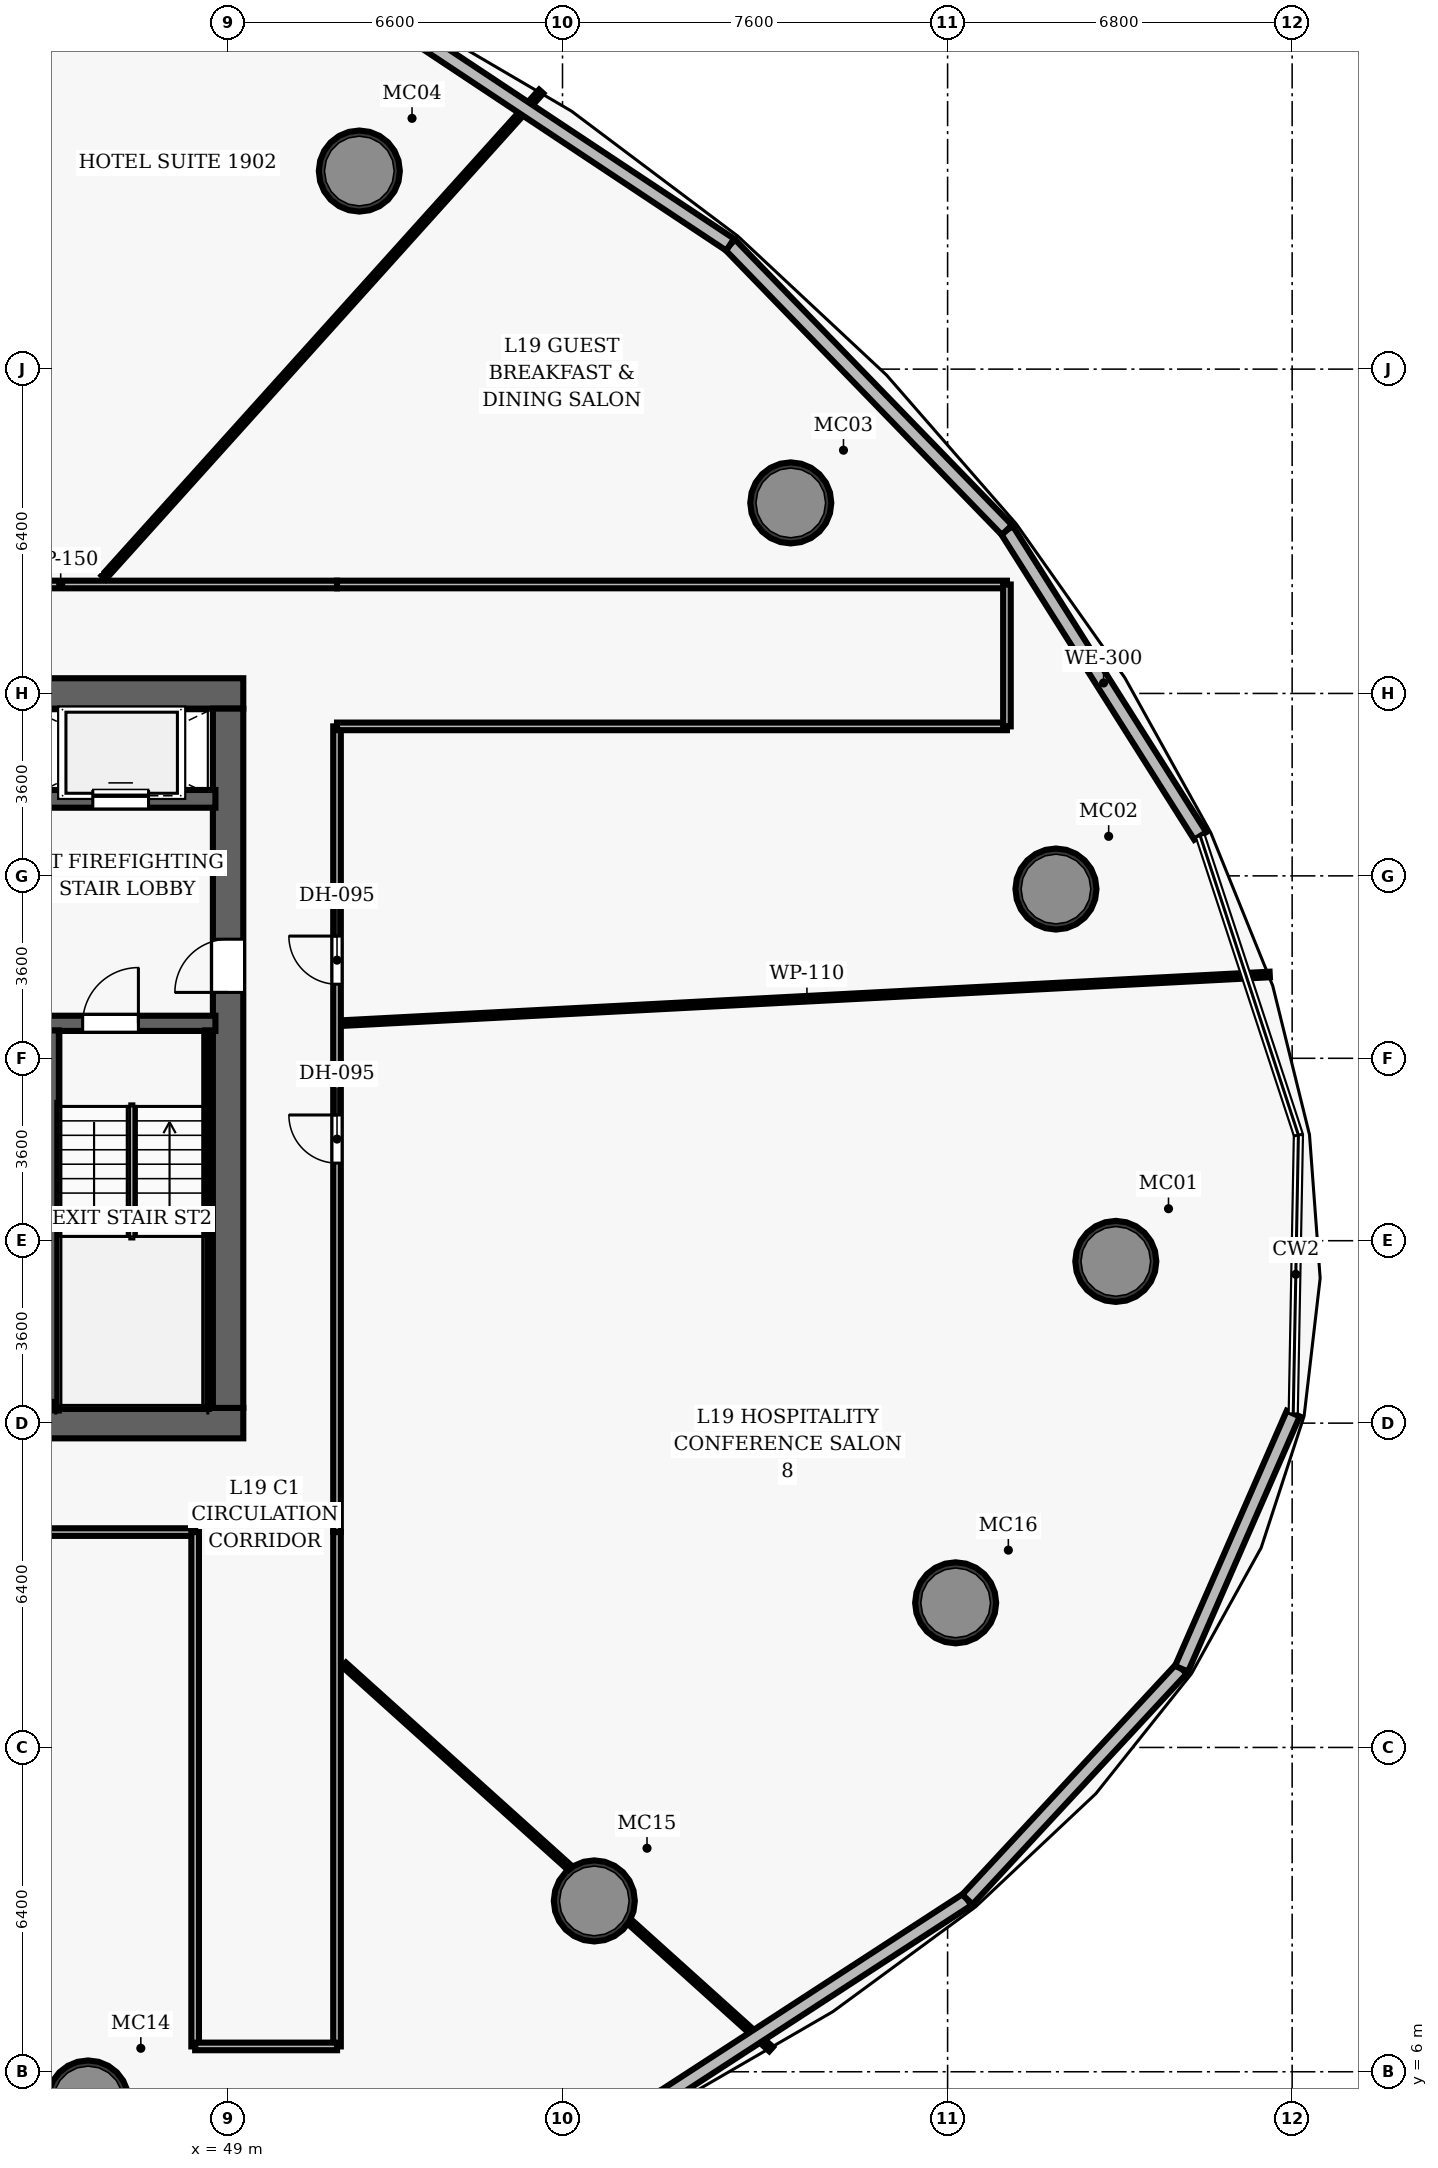
"""IFC4 building model, lengths in metres.
Left out: names, types, materials, properties, quantities, classifications, styles, units other than length and angle.
Written with IfcOpenShell. Run it as: python <this file> out.ifc"""

import sys

from ifc_helpers import new_model, si_unit, direction, frame, frame_2d, origin, origin_2d, place, context, subcontext, project, spatial, rectangle, hollow_circle, extrude, element, fill, save


model = new_model("IFC4")
c1 = context("Model", 3, precision=1e-05, world=origin(), true_north=direction((0.0, 1.0)))
c2 = subcontext(c1, "Body", "Model", "MODEL_VIEW")
j1 = project(units=[si_unit("LENGTHUNIT", "METRE"), si_unit("PLANEANGLEUNIT", "RADIAN")], contexts=[c1])
p1 = place(None, origin())
s1 = spatial("IfcSite", under=j1, at=p1, CompositionType="ELEMENT")
p2 = place(p1, origin())
s2 = spatial("IfcBuilding", under=s1, at=p2, CompositionType="ELEMENT")
p3 = place(p2, frame((0.0, 0.0, 83.4)))
s3 = spatial("IfcBuildingStorey", under=s2, at=p3, CompositionType="ELEMENT", Elevation=83.4)
p4 = place(p3, frame((26.7, 18.8, 0.0), z_axis=(0.0, 0.0, 1.0), x_axis=(1.0, 0.0, 0.0)))
e1 = element("IfcWall", 1, at=p4, inside=s3, PredefinedType="SHEAR", context=c2, shape_type="SweptSolid", body=[
    extrude(rectangle(XDim=22.6, YDim=0.6, at=frame_2d((11.3, 0.0))), origin(), (0.0, 0.0, 1.0), 3.5),
])
p5 = place(p4, frame((14.52, 0.0, 0.0)))
e2 = element("IfcOpeningElement", 2, at=p5, cuts=e1, PredefinedType="OPENING", context=c2, shape_type="SweptSolid", body=[
    extrude(rectangle(XDim=1.05, YDim=2.15, at=frame_2d((0.525, 1.075))), frame((0.0, 0.31, 0.0), z_axis=(0.0, -1.0, 0.0), x_axis=(1.0, 0.0, 0.0)), (0.0, 0.0, 1.0), 0.62),
])
p6 = place(p3, frame((26.7, 33.2, 0.0), z_axis=(0.0, 0.0, 1.0), x_axis=(1.0, 0.0, 0.0)))
e3 = element("IfcWall", 3, at=p6, inside=s3, PredefinedType="SHEAR", context=c2, shape_type="SweptSolid", body=[
    extrude(rectangle(XDim=22.6, YDim=0.6, at=frame_2d((11.3, 0.0))), origin(), (0.0, 0.0, 1.0), 3.5),
])
p7 = place(p6, frame((4.62, 0.0, 0.0)))
e4 = element("IfcOpeningElement", 4, at=p7, cuts=e3, PredefinedType="OPENING", context=c2, shape_type="SweptSolid", body=[
    extrude(rectangle(XDim=1.05, YDim=2.15, at=frame_2d((0.525, 1.075))), frame((0.0, 0.31, 0.0), z_axis=(0.0, -1.0, 0.0), x_axis=(1.0, 0.0, 0.0)), (0.0, 0.0, 1.0), 0.62),
])
p8 = place(p6, frame((14.52, 0.0, 0.0)))
e5 = element("IfcOpeningElement", 5, at=p8, cuts=e3, PredefinedType="OPENING", context=c2, shape_type="SweptSolid", body=[
    extrude(rectangle(XDim=1.05, YDim=2.15, at=frame_2d((0.525, 1.075))), frame((0.0, 0.31, 0.0), z_axis=(0.0, -1.0, 0.0), x_axis=(1.0, 0.0, 0.0)), (0.0, 0.0, 1.0), 0.62),
])
p9 = place(p3, frame((49.0, 19.1, 0.0), z_axis=(0.0, 0.0, 1.0), x_axis=(0.0, 1.0, 0.0)))
e6 = element("IfcWall", 6, at=p9, inside=s3, PredefinedType="SHEAR", context=c2, shape_type="SweptSolid", body=[
    extrude(rectangle(XDim=13.8, YDim=0.6, at=frame_2d((6.9, 0.0))), origin(), (0.0, 0.0, 1.0), 3.5),
])
p10 = place(p9, frame((8.2, 0.0, 0.0)))
e7 = element("IfcOpeningElement", 7, at=p10, cuts=e6, PredefinedType="OPENING", context=c2, shape_type="SweptSolid", body=[
    extrude(rectangle(XDim=1.05, YDim=2.15, at=frame_2d((0.525, 1.075))), frame((0.0, 0.31, 0.0), z_axis=(0.0, -1.0, 0.0), x_axis=(1.0, 0.0, 0.0)), (0.0, 0.0, 1.0), 0.62),
])
for number, where, z_axis, x_axis in (
    (8, (66.52, 21.992, 0.0), (0.0, 0.0, 1.0), (1.0, 0.0, 0.0)),
    (9, (65.339, 29.34, 0.0), (0.0, 0.0, 1.0), (1.0, 0.0, 0.0)),
    (10, (60.105, 36.96, 0.0), (0.0, 0.0, 1.0), (1.0, 0.0, 0.0)),
    (11, (51.59, 43.509, 0.0), (0.0, 0.0, 1.0), (1.0, 0.0, 0.0)),
    (12, (46.238, 5.423, 0.0), (0.0, 0.0, 1.0), (1.0, 0.0, 0.0)),
    (13, (56.228, 9.371, 0.0), (0.0, 0.0, 1.0), (1.0, 0.0, 0.0)),
    (14, (63.359, 15.254, 0.0), (0.0, 0.0, 1.0), (1.0, 0.0, 0.0)),
):
    element("IfcColumn", number, at=place(p3, frame(where, z_axis=z_axis, x_axis=x_axis)), inside=s3, PredefinedType="COLUMN", context=c2, shape_type="SweptSolid", body=[
        extrude(hollow_circle(Radius=0.8, WallThickness=0.06, at=origin_2d()), origin(), (0.0, 0.0, 1.0), 3.5),
    ])
p11 = place(p3, frame((45.08, 26.69, 0.0), z_axis=(0.0, 0.0, 1.0), x_axis=(1.0, 0.0, 0.0)))
e15 = element("IfcWall", 15, at=p11, inside=s3, PredefinedType="SHEAR", context=c2, shape_type="SweptSolid", body=[
    extrude(rectangle(XDim=3.67, YDim=0.3, at=frame_2d((1.835, 0.0))), origin(), (0.0, 0.0, 1.0), 3.5),
])
p12 = place(p11, frame((1.05, 0.0, 0.0)))
e16 = element("IfcOpeningElement", 16, at=p12, cuts=e15, PredefinedType="OPENING", context=c2, shape_type="SweptSolid", body=[
    extrude(rectangle(XDim=1.1, YDim=2.15, at=frame_2d((0.55, 1.075))), frame((0.0, 0.16, 0.0), z_axis=(0.0, -1.0, 0.0), x_axis=(1.0, 0.0, 0.0)), (0.0, 0.0, 1.0), 0.32),
])
p13 = place(p3, frame((45.51, 19.05, 0.0), z_axis=(0.0, 0.0, 1.0), x_axis=(0.0, 1.0, 0.0)))
e17 = element("IfcWall", 17, at=p13, inside=s3, PredefinedType="SHEAR", context=c2, shape_type="SweptSolid", body=[
    extrude(rectangle(XDim=7.5, YDim=0.3, at=frame_2d((3.75, 0.0))), origin(), (0.0, 0.0, 1.0), 3.5),
])
p14 = place(p3, frame((48.605, 19.1, 0.0), z_axis=(0.0, 0.0, 1.0), x_axis=(0.0, 1.0, 0.0)))
e18 = element("IfcWall", 18, at=p14, inside=s3, PredefinedType="SHEAR", context=c2, shape_type="SweptSolid", body=[
    extrude(rectangle(XDim=7.45, YDim=0.12, at=frame_2d((3.725, 0.0))), origin(), (0.0, 0.0, 1.0), 3.5),
])
p15 = place(p3, frame((45.51, 19.16, 0.0), z_axis=(0.0, 0.0, 1.0), x_axis=(1.0, 0.0, 0.0)))
e19 = element("IfcWall", 19, at=p15, inside=s3, PredefinedType="SHEAR", context=c2, shape_type="SweptSolid", body=[
    extrude(rectangle(XDim=3.095, YDim=0.12, at=frame_2d((1.547, 0.0))), origin(), (0.0, 0.0, 1.0), 3.5),
])
p16 = place(p3, frame((45.08, 31.12, 0.0), z_axis=(0.0, 0.0, 1.0), x_axis=(1.0, 0.0, 0.0)))
e20 = element("IfcWall", 20, at=p16, inside=s3, PredefinedType="SHEAR", context=c2, shape_type="SweptSolid", body=[
    extrude(rectangle(XDim=3.67, YDim=0.35, at=frame_2d((1.835, 0.0))), origin(), (0.0, 0.0, 1.0), 2.6),
])
p17 = place(p16, frame((1.25, 0.0, 0.0)))
e21 = element("IfcOpeningElement", 21, at=p17, cuts=e20, PredefinedType="OPENING", context=c2, shape_type="SweptSolid", body=[
    extrude(rectangle(XDim=1.1, YDim=2.15, at=frame_2d((0.55, 1.075))), frame((0.0, 0.185, 0.0), z_axis=(0.0, -1.0, 0.0), x_axis=(1.0, 0.0, 0.0)), (0.0, 0.0, 1.0), 0.37),
])
p18 = place(p3, frame((27.65, 35.35, 0.0), z_axis=(0.0, 0.0, 1.0), x_axis=(1.0, 0.0, 0.0)))
e22 = element("IfcWall", 22, at=p18, inside=s3, PredefinedType="PARTITIONING", context=c2, shape_type="SweptSolid", body=[
    extrude(rectangle(XDim=23.5, YDim=0.15, at=frame_2d((11.75, 0.0))), origin(), (0.0, 0.0, 1.0), 2.6),
])
p19 = place(p18, frame((11.493, 0.0, 0.0)))
e23 = element("IfcOpeningElement", 23, at=p19, cuts=e22, PredefinedType="OPENING", context=c2, shape_type="SweptSolid", body=[
    extrude(rectangle(XDim=0.95, YDim=2.15, at=frame_2d((0.475, 1.075))), frame((0.0, 0.085, 0.0), z_axis=(0.0, -1.0, 0.0), x_axis=(1.0, 0.0, 0.0)), (0.0, 0.0, 1.0), 0.17),
])
p20 = place(p18, frame((7.137, 0.0, 0.0)))
e24 = element("IfcOpeningElement", 24, at=p20, cuts=e22, PredefinedType="OPENING", context=c2, shape_type="SweptSolid", body=[
    extrude(rectangle(XDim=0.95, YDim=2.15, at=frame_2d((0.475, 1.075))), frame((0.0, 0.085, 0.0), z_axis=(0.0, -1.0, 0.0), x_axis=(1.0, 0.0, 0.0)), (0.0, 0.0, 1.0), 0.17),
])
p21 = place(p3, frame((24.85, 16.65, 0.0), z_axis=(0.0, 0.0, 1.0), x_axis=(1.0, 0.0, 0.0)))
e25 = element("IfcWall", 25, at=p21, inside=s3, PredefinedType="PARTITIONING", context=c2, shape_type="SweptSolid", body=[
    extrude(rectangle(XDim=23.5, YDim=0.15, at=frame_2d((11.75, 0.0))), origin(), (0.0, 0.0, 1.0), 2.6),
])
p22 = place(p21, frame((11.057, 0.0, 0.0)))
e26 = element("IfcOpeningElement", 26, at=p22, cuts=e25, PredefinedType="OPENING", context=c2, shape_type="SweptSolid", body=[
    extrude(rectangle(XDim=0.95, YDim=2.15, at=frame_2d((0.475, 1.075))), frame((0.0, 0.085, 0.0), z_axis=(0.0, -1.0, 0.0), x_axis=(1.0, 0.0, 0.0)), (0.0, 0.0, 1.0), 0.17),
])
p23 = place(p21, frame((15.413, 0.0, 0.0)))
e27 = element("IfcOpeningElement", 27, at=p23, cuts=e25, PredefinedType="OPENING", context=c2, shape_type="SweptSolid", body=[
    extrude(rectangle(XDim=0.95, YDim=2.15, at=frame_2d((0.475, 1.075))), frame((0.0, 0.085, 0.0), z_axis=(0.0, -1.0, 0.0), x_axis=(1.0, 0.0, 0.0)), (0.0, 0.0, 1.0), 0.17),
])
p24 = place(p3, frame((51.15, 16.65, 0.0), z_axis=(0.0, 0.0, 1.0), x_axis=(0.0, 1.0, 0.0)))
e28 = element("IfcWall", 28, at=p24, inside=s3, PredefinedType="PARTITIONING", context=c2, shape_type="SweptSolid", body=[
    extrude(rectangle(XDim=15.9, YDim=0.15, at=frame_2d((7.95, 0.0))), origin(), (0.0, 0.0, 1.0), 2.6),
])
p25 = place(p24, frame((10.812, 0.0, 0.0)))
e29 = element("IfcOpeningElement", 29, at=p25, cuts=e28, PredefinedType="OPENING", context=c2, shape_type="SweptSolid", body=[
    extrude(rectangle(XDim=0.95, YDim=2.15, at=frame_2d((0.475, 1.075))), frame((0.0, 0.085, 0.0), z_axis=(0.0, -1.0, 0.0), x_axis=(1.0, 0.0, 0.0)), (0.0, 0.0, 1.0), 0.17),
])
p26 = place(p24, frame((7.281, 0.0, 0.0)))
e30 = element("IfcOpeningElement", 30, at=p26, cuts=e28, PredefinedType="OPENING", context=c2, shape_type="SweptSolid", body=[
    extrude(rectangle(XDim=0.95, YDim=2.15, at=frame_2d((0.475, 1.075))), frame((0.0, 0.085, 0.0), z_axis=(0.0, -1.0, 0.0), x_axis=(1.0, 0.0, 0.0)), (0.0, 0.0, 1.0), 0.17),
])
for number, where, z_axis, x_axis in (
    (31, (51.15, 35.35, 0.0), (0.0, 0.0, 1.0), (1.0, 0.0, 0.0)),
    (32, (51.15, 32.55, 0.0), (0.0, 0.0, 1.0), (1.0, 0.0, 0.0)),
):
    element("IfcWall", number, at=place(p3, frame(where, z_axis=z_axis, x_axis=x_axis)), inside=s3, PredefinedType="PARTITIONING", context=c2, shape_type="SweptSolid", body=[
        extrude(rectangle(XDim=13.221, YDim=0.15, at=frame_2d((6.611, 0.0))), origin(), (0.0, 0.0, 1.0), 2.6),
    ])
p27 = place(p3, frame((64.371, 32.55, 0.0), z_axis=(0.0, 0.0, 1.0), x_axis=(0.0, 1.0, 0.0)))
e33 = element("IfcWall", 33, at=p27, inside=s3, PredefinedType="PARTITIONING", context=c2, shape_type="SweptSolid", body=[
    extrude(rectangle(XDim=2.8, YDim=0.15, at=frame_2d((1.4, 0.0))), origin(), (0.0, 0.0, 1.0), 2.6),
])
for number, where, z_axis, x_axis in (
    (34, (48.35, 6.5, 0.0), (0.0, 0.0, 1.0), (0.0, 1.0, 0.0)),
    (35, (51.15, 6.5, 0.0), (0.0, 0.0, 1.0), (0.0, 1.0, 0.0)),
):
    element("IfcWall", number, at=place(p3, frame(where, z_axis=z_axis, x_axis=x_axis)), inside=s3, PredefinedType="PARTITIONING", context=c2, shape_type="SweptSolid", body=[
        extrude(rectangle(XDim=10.15, YDim=0.15, at=frame_2d((5.075, 0.0))), origin(), (0.0, 0.0, 1.0), 2.6),
    ])
p28 = place(p3, frame((48.35, 6.5, 0.0), z_axis=(0.0, 0.0, 1.0), x_axis=(1.0, 0.0, 0.0)))
e36 = element("IfcWall", 36, at=p28, inside=s3, PredefinedType="PARTITIONING", context=c2, shape_type="SweptSolid", body=[
    extrude(rectangle(XDim=2.8, YDim=0.15, at=frame_2d((1.4, 0.0))), origin(), (0.0, 0.0, 1.0), 2.6),
])
p29 = place(p3, frame((51.29, 26.697, 0.0), z_axis=(0.0, 0.0, 1.0), x_axis=(0.998629785632, 0.052331169003, 0.0)))
e37 = element("IfcWall", 37, at=p29, inside=s3, PredefinedType="PARTITIONING", context=c2, shape_type="SweptSolid", body=[
    extrude(rectangle(XDim=18.293, YDim=0.11, at=frame_2d((9.146, 0.0))), origin(), (0.0, 0.0, 1.0), 2.6),
])
p30 = place(p3, frame((46.545, 35.49, 0.0), z_axis=(0.0, 0.0, 1.0), x_axis=(0.669127792896, 0.743147358721, 0.0)))
e38 = element("IfcWall", 38, at=p30, inside=s3, PredefinedType="PARTITIONING", context=c2, shape_type="SweptSolid", body=[
    extrude(rectangle(XDim=12.903, YDim=0.11, at=frame_2d((6.452, 0.0))), origin(), (0.0, 0.0, 1.0), 2.6),
])
p31 = place(p3, frame((51.29, 14.034, 0.0), z_axis=(0.0, 0.0, 1.0), x_axis=(0.743147463393, -0.669127676646, 0.0)))
e39 = element("IfcWall", 39, at=p31, inside=s3, PredefinedType="PARTITIONING", context=c2, shape_type="SweptSolid", body=[
    extrude(rectangle(XDim=11.34, YDim=0.11, at=frame_2d((5.67, 0.0))), origin(), (0.0, 0.0, 1.0), 2.6),
])
p32 = place(p3, frame((64.371, 36.426, 0.0), z_axis=(0.0, 0.0, 1.0), x_axis=(0.534167874198, -0.845378425425, 0.0)))
e40 = element("IfcWall", 40, at=p32, inside=s3, PredefinedType="SOLIDWALL", context=c2, shape_type="SweptSolid", body=[
    extrude(rectangle(XDim=7.143, YDim=0.28, at=frame_2d((3.571, 0.0))), origin(), (0.0, 0.0, 1.0), 3.25),
])
p33 = place(p3, frame((58.908, 42.057, 0.0), z_axis=(0.0, 0.0, 1.0), x_axis=(0.696304267375, -0.717746729171, 0.0)))
e41 = element("IfcWall", 41, at=p33, inside=s3, PredefinedType="SOLIDWALL", context=c2, shape_type="SweptSolid", body=[
    extrude(rectangle(XDim=7.845, YDim=0.28, at=frame_2d((3.922, 0.0))), origin(), (0.0, 0.0, 1.0), 3.25),
])
p34 = place(p3, frame((52.101, 46.575, 0.0), z_axis=(0.0, 0.0, 1.0), x_axis=(0.833156470186, -0.553037337064, 0.0)))
e42 = element("IfcWall", 42, at=p34, inside=s3, PredefinedType="SOLIDWALL", context=c2, shape_type="SweptSolid", body=[
    extrude(rectangle(XDim=8.171, YDim=0.28, at=frame_2d((4.085, 0.0))), origin(), (0.0, 0.0, 1.0), 3.25),
])
p35 = place(p3, frame((63.591, 9.4, 0.0), z_axis=(0.0, 0.0, 1.0), x_axis=(-0.838544340637, -0.544833358731, 0.0)))
e43 = element("IfcWall", 43, at=p35, inside=s3, PredefinedType="SOLIDWALL", context=c2, shape_type="SweptSolid", body=[
    extrude(rectangle(XDim=7.143, YDim=0.28, at=frame_2d((3.571, 0.0))), origin(), (0.0, 0.0, 1.0), 3.25),
])
p36 = place(p3, frame((67.817, 13.953, 0.0), z_axis=(0.0, 0.0, 1.0), x_axis=(-0.680325974801, -0.732909658833, 0.0)))
e44 = element("IfcWall", 44, at=p36, inside=s3, PredefinedType="SOLIDWALL", context=c2, shape_type="SweptSolid", body=[
    extrude(rectangle(XDim=6.212, YDim=0.28, at=frame_2d((3.106, 0.0))), origin(), (0.0, 0.0, 1.0), 3.25),
])
p37 = place(p3, frame((70.021, 18.989, 0.0), z_axis=(0.0, 0.0, 1.0), x_axis=(-0.400977247708, -0.916088012595, 0.0)))
e45 = element("IfcWall", 45, at=p37, inside=s3, PredefinedType="SOLIDWALL", context=c2, shape_type="SweptSolid", body=[
    extrude(rectangle(XDim=5.497, YDim=0.28, at=frame_2d((2.749, 0.0))), origin(), (0.0, 0.0, 1.0), 3.25),
])
p38 = place(p12, origin())
e46 = element("IfcDoor", 46, at=p38, inside=s3, OperationType="SINGLE_SWING_RIGHT", PredefinedType="DOOR", context=c2, shape_type="SweptSolid", body=[
    extrude(rectangle(XDim=1.1, YDim=2.15, at=frame_2d((0.55, 1.075))), frame((0.0, 0.025, 0.0), z_axis=(0.0, -1.0, 0.0), x_axis=(1.0, 0.0, 0.0)), (0.0, 0.0, 1.0), 0.05),
])
fill(e16, e46)
p39 = place(p10, origin())
e47 = element("IfcDoor", 47, at=p39, inside=s3, OperationType="SINGLE_SWING_LEFT", PredefinedType="DOOR", context=c2, shape_type="SweptSolid", body=[
    extrude(rectangle(XDim=1.05, YDim=2.15, at=frame_2d((0.525, 1.075))), frame((0.0, 0.025, 0.0), z_axis=(0.0, -1.0, 0.0), x_axis=(1.0, 0.0, 0.0)), (0.0, 0.0, 1.0), 0.05),
])
fill(e7, e47)
p40 = place(p25, origin())
e48 = element("IfcDoor", 48, at=p40, inside=s3, OperationType="SINGLE_SWING_RIGHT", PredefinedType="DOOR", context=c2, shape_type="SweptSolid", body=[
    extrude(rectangle(XDim=0.95, YDim=2.15, at=frame_2d((0.475, 1.075))), frame((0.0, 0.025, 0.0), z_axis=(0.0, -1.0, 0.0), x_axis=(1.0, 0.0, 0.0)), (0.0, 0.0, 1.0), 0.05),
])
fill(e29, e48)
p41 = place(p26, origin())
e49 = element("IfcDoor", 49, at=p41, inside=s3, OperationType="SINGLE_SWING_RIGHT", PredefinedType="DOOR", context=c2, shape_type="SweptSolid", body=[
    extrude(rectangle(XDim=0.95, YDim=2.15, at=frame_2d((0.475, 1.075))), frame((0.0, 0.025, 0.0), z_axis=(0.0, -1.0, 0.0), x_axis=(1.0, 0.0, 0.0)), (0.0, 0.0, 1.0), 0.05),
])
fill(e30, e49)
p42 = place(p17, origin())
e50 = element("IfcDoor", 50, at=p42, inside=s3, OperationType="SLIDING_TO_LEFT", PredefinedType="DOOR", context=c2, shape_type="SweptSolid", body=[
    extrude(rectangle(XDim=1.1, YDim=2.15, at=frame_2d((0.55, 1.075))), frame((0.0, 0.025, 0.0), z_axis=(0.0, -1.0, 0.0), x_axis=(1.0, 0.0, 0.0)), (0.0, 0.0, 1.0), 0.05),
])
fill(e21, e50)
save(model, sys.argv[1])
